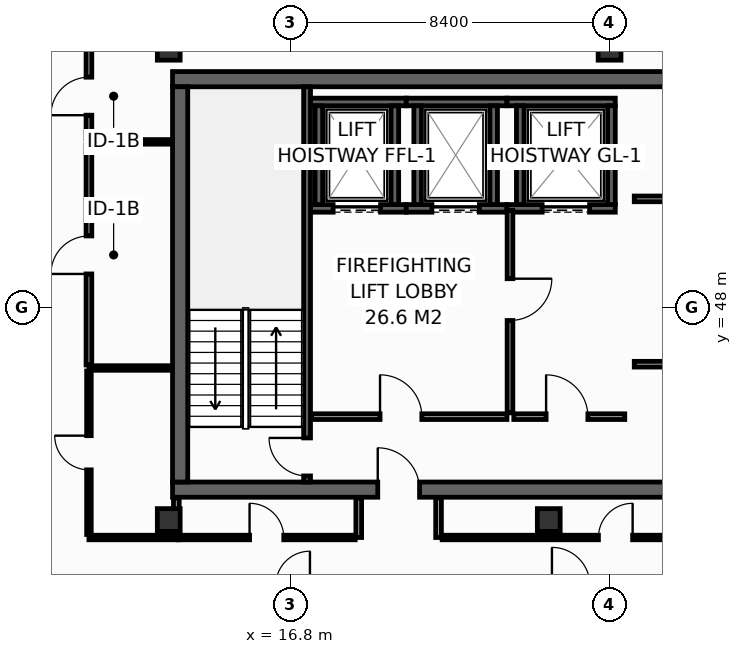
"""IFC4 building model, lengths in metres.
Left out: names, types, materials, properties, quantities, classifications, styles, units other than length and angle.
Written with IfcOpenShell. Run it as: python <this file> out.ifc"""

import sys

from ifc_helpers import new_model, si_unit, direction, frame, frame_2d, origin, origin_2d, place, context, subcontext, project, spatial, rectangle, hollow_rectangle, extrude, element, fill, save


model = new_model("IFC4")
c1 = context("Model", 3, precision=1e-05, world=origin(), true_north=direction((0.0, 1.0)))
c2 = subcontext(c1, "Body", "Model", "MODEL_VIEW")
j1 = project(units=[si_unit("LENGTHUNIT", "METRE"), si_unit("PLANEANGLEUNIT", "RADIAN")], contexts=[c1])
p1 = place(None, origin())
s1 = spatial("IfcSite", under=j1, at=p1, CompositionType="ELEMENT")
p2 = place(p1, origin())
s2 = spatial("IfcBuilding", under=s1, at=p2, CompositionType="ELEMENT")
p3 = place(p2, frame((0.0, 0.0, 319.2)))
s3 = spatial("IfcBuildingStorey", under=s2, at=p3, CompositionType="ELEMENT", Elevation=319.2)
p4 = place(p3, frame((13.7, 43.2, 0.0), z_axis=(0.0, 0.0, 1.0), x_axis=(1.0, 0.0, 0.0)))
e1 = element("IfcWall", 1, at=p4, inside=s3, PredefinedType="SHEAR", context=c2, shape_type="SweptSolid", body=[
    extrude(rectangle(XDim=32.5, YDim=0.4, at=frame_2d((16.25, 0.0))), origin(), (0.0, 0.0, 1.0), 3.95),
])
p5 = place(p4, frame((5.4, 0.0, 0.0)))
e2 = element("IfcOpeningElement", 2, at=p5, cuts=e1, PredefinedType="OPENING", context=c2, shape_type="SweptSolid", body=[
    extrude(rectangle(XDim=1.1, YDim=2.15, at=frame_2d((0.55, 1.075))), frame((0.0, 0.21, 0.0), z_axis=(0.0, -1.0, 0.0), x_axis=(1.0, 0.0, 0.0)), (0.0, 0.0, 1.0), 0.42),
])
p6 = place(p4, frame((25.6, 0.0, 0.0)))
e3 = element("IfcOpeningElement", 3, at=p6, cuts=e1, PredefinedType="OPENING", context=c2, shape_type="SweptSolid", body=[
    extrude(rectangle(XDim=1.1, YDim=2.15, at=frame_2d((0.55, 1.075))), frame((0.0, 0.21, 0.0), z_axis=(0.0, -1.0, 0.0), x_axis=(1.0, 0.0, 0.0)), (0.0, 0.0, 1.0), 0.42),
])
p7 = place(p3, frame((13.7, 54.0, 0.0), z_axis=(0.0, 0.0, 1.0), x_axis=(1.0, 0.0, 0.0)))
e4 = element("IfcWall", 4, at=p7, inside=s3, PredefinedType="SHEAR", context=c2, shape_type="SweptSolid", body=[
    extrude(rectangle(XDim=32.5, YDim=0.4, at=frame_2d((16.25, 0.0))), origin(), (0.0, 0.0, 1.0), 3.95),
])
p8 = place(p3, frame((13.9, 43.4, 0.0), z_axis=(0.0, 0.0, 1.0), x_axis=(0.0, 1.0, 0.0)))
e5 = element("IfcWall", 5, at=p8, inside=s3, PredefinedType="SHEAR", context=c2, shape_type="SweptSolid", body=[
    extrude(rectangle(XDim=10.4, YDim=0.4, at=frame_2d((5.2, 0.0))), origin(), (0.0, 0.0, 1.0), 3.95),
])
for number, where, z_axis, x_axis in (
    (6, (13.6, 54.8, 0.0), (0.0, 0.0, 1.0), (1.0, 0.0, 0.0)),
    (7, (25.2, 54.8, 0.0), (0.0, 0.0, 1.0), (1.0, 0.0, 0.0)),
    (8, (13.6, 42.4, 0.0), (0.0, 0.0, 1.0), (1.0, 0.0, 0.0)),
    (9, (23.6, 42.4, 0.0), (0.0, 0.0, 1.0), (1.0, 0.0, 0.0)),
):
    element("IfcColumn", number, at=place(p3, frame(where, z_axis=z_axis, x_axis=x_axis)), inside=s3, PredefinedType="COLUMN", context=c2, shape_type="SweptSolid", body=[
        extrude(hollow_rectangle(XDim=0.6, YDim=0.6, WallThickness=0.028, at=origin_2d()), origin(), (0.0, 0.0, 1.0), 4.2),
    ])
p9 = place(p3, frame((17.33, 50.6, 0.0), z_axis=(0.0, 0.0, 1.0), x_axis=(1.0, 0.0, 0.0)))
e10 = element("IfcWall", 10, at=p9, inside=s3, PredefinedType="SHEAR", context=c2, shape_type="SweptSolid", body=[
    extrude(rectangle(XDim=2.52, YDim=0.2, at=frame_2d((1.26, 0.0))), origin(), (0.0, 0.0, 1.0), 3.95),
])
p10 = place(p9, frame((0.595, 0.0, 0.0)))
e11 = element("IfcOpeningElement", 11, at=p10, cuts=e10, PredefinedType="OPENING", context=c2, shape_type="SweptSolid", body=[
    extrude(rectangle(XDim=1.25, YDim=2.3, at=frame_2d((0.625, 1.15))), frame((0.0, 0.11, 0.0), z_axis=(0.0, -1.0, 0.0), x_axis=(1.0, 0.0, 0.0)), (0.0, 0.0, 1.0), 0.22),
])
p11 = place(p3, frame((17.33, 53.4, 0.0), z_axis=(0.0, 0.0, 1.0), x_axis=(1.0, 0.0, 0.0)))
e12 = element("IfcWall", 12, at=p11, inside=s3, PredefinedType="SHEAR", context=c2, shape_type="SweptSolid", body=[
    extrude(rectangle(XDim=2.52, YDim=0.2, at=frame_2d((1.26, 0.0))), origin(), (0.0, 0.0, 1.0), 3.95),
])
for number, where, z_axis, x_axis in (
    (13, (17.55, 50.7, 0.0), (0.0, 0.0, 1.0), (0.0, 1.0, 0.0)),
    (14, (19.55, 50.7, 0.0), (0.0, 0.0, 1.0), (0.0, 1.0, 0.0)),
):
    element("IfcWall", number, at=place(p3, frame(where, z_axis=z_axis, x_axis=x_axis)), inside=s3, PredefinedType="SHEAR", context=c2, shape_type="SweptSolid", body=[
        extrude(rectangle(XDim=2.6, YDim=0.2, at=frame_2d((1.3, 0.0))), origin(), (0.0, 0.0, 1.0), 3.95),
    ])
p12 = place(p3, frame((19.85, 50.6, 0.0), z_axis=(0.0, 0.0, 1.0), x_axis=(1.0, 0.0, 0.0)))
e15 = element("IfcWall", 15, at=p12, inside=s3, PredefinedType="SHEAR", context=c2, shape_type="SweptSolid", body=[
    extrude(rectangle(XDim=2.65, YDim=0.2, at=frame_2d((1.325, 0.0))), origin(), (0.0, 0.0, 1.0), 3.95),
])
p13 = place(p12, frame((0.675, 0.0, 0.0)))
e16 = element("IfcOpeningElement", 16, at=p13, cuts=e15, PredefinedType="OPENING", context=c2, shape_type="SweptSolid", body=[
    extrude(rectangle(XDim=1.25, YDim=2.3, at=frame_2d((0.625, 1.15))), frame((0.0, 0.11, 0.0), z_axis=(0.0, -1.0, 0.0), x_axis=(1.0, 0.0, 0.0)), (0.0, 0.0, 1.0), 0.22),
])
p14 = place(p3, frame((19.85, 53.4, 0.0), z_axis=(0.0, 0.0, 1.0), x_axis=(1.0, 0.0, 0.0)))
e17 = element("IfcWall", 17, at=p14, inside=s3, PredefinedType="SHEAR", context=c2, shape_type="SweptSolid", body=[
    extrude(rectangle(XDim=2.65, YDim=0.2, at=frame_2d((1.325, 0.0))), origin(), (0.0, 0.0, 1.0), 3.95),
])
for number, where, z_axis, x_axis in (
    (18, (20.15, 50.7, 0.0), (0.0, 0.0, 1.0), (0.0, 1.0, 0.0)),
    (19, (22.15, 50.7, 0.0), (0.0, 0.0, 1.0), (0.0, 1.0, 0.0)),
):
    element("IfcWall", number, at=place(p3, frame(where, z_axis=z_axis, x_axis=x_axis)), inside=s3, PredefinedType="SHEAR", context=c2, shape_type="SweptSolid", body=[
        extrude(rectangle(XDim=2.6, YDim=0.2, at=frame_2d((1.3, 0.0))), origin(), (0.0, 0.0, 1.0), 3.95),
    ])
p15 = place(p3, frame((22.5, 50.6, 0.0), z_axis=(0.0, 0.0, 1.0), x_axis=(1.0, 0.0, 0.0)))
e20 = element("IfcWall", 20, at=p15, inside=s3, PredefinedType="SHEAR", context=c2, shape_type="SweptSolid", body=[
    extrude(rectangle(XDim=2.85, YDim=0.2, at=frame_2d((1.425, 0.0))), origin(), (0.0, 0.0, 1.0), 3.95),
])
p16 = place(p15, frame((0.925, 0.0, 0.0)))
e21 = element("IfcOpeningElement", 21, at=p16, cuts=e20, PredefinedType="OPENING", context=c2, shape_type="SweptSolid", body=[
    extrude(rectangle(XDim=1.25, YDim=2.3, at=frame_2d((0.625, 1.15))), frame((0.0, 0.11, 0.0), z_axis=(0.0, -1.0, 0.0), x_axis=(1.0, 0.0, 0.0)), (0.0, 0.0, 1.0), 0.22),
])
p17 = place(p3, frame((22.5, 53.4, 0.0), z_axis=(0.0, 0.0, 1.0), x_axis=(1.0, 0.0, 0.0)))
e22 = element("IfcWall", 22, at=p17, inside=s3, PredefinedType="SHEAR", context=c2, shape_type="SweptSolid", body=[
    extrude(rectangle(XDim=2.85, YDim=0.2, at=frame_2d((1.425, 0.0))), origin(), (0.0, 0.0, 1.0), 3.95),
])
for number, where, z_axis, x_axis in (
    (23, (22.85, 50.7, 0.0), (0.0, 0.0, 1.0), (0.0, 1.0, 0.0)),
    (24, (25.25, 50.7, 0.0), (0.0, 0.0, 1.0), (0.0, 1.0, 0.0)),
):
    element("IfcWall", number, at=place(p3, frame(where, z_axis=z_axis, x_axis=x_axis)), inside=s3, PredefinedType="SHEAR", context=c2, shape_type="SweptSolid", body=[
        extrude(rectangle(XDim=2.6, YDim=0.2, at=frame_2d((1.3, 0.0))), origin(), (0.0, 0.0, 1.0), 3.95),
    ])
p18 = place(p3, frame((17.24, 43.4, 0.0), z_axis=(0.0, 0.0, 1.0), x_axis=(0.0, 1.0, 0.0)))
e25 = element("IfcWall", 25, at=p18, inside=s3, PredefinedType="SHEAR", context=c2, shape_type="SweptSolid", body=[
    extrude(rectangle(XDim=10.4, YDim=0.18, at=frame_2d((5.2, 0.0))), origin(), (0.0, 0.0, 1.0), 3.95),
])
p19 = place(p18, frame((0.16, 0.0, 0.0)))
e26 = element("IfcOpeningElement", 26, at=p19, cuts=e25, PredefinedType="OPENING", context=c2, shape_type="SweptSolid", body=[
    extrude(rectangle(XDim=1.0, YDim=2.15, at=frame_2d((0.5, 1.075))), frame((0.0, 0.1, 0.0), z_axis=(0.0, -1.0, 0.0), x_axis=(1.0, 0.0, 0.0)), (0.0, 0.0, 1.0), 0.2),
])
p20 = place(p3, frame((17.36, 45.12, 0.0), z_axis=(0.0, 0.0, 1.0), x_axis=(1.0, 0.0, 0.0)))
e27 = element("IfcWall", 27, at=p20, inside=s3, PredefinedType="PARTITIONING", context=c2, shape_type="SweptSolid", body=[
    extrude(rectangle(XDim=5.14, YDim=0.15, at=frame_2d((2.57, 0.0))), origin(), (0.0, 0.0, 1.0), 3.95),
])
p21 = place(p20, frame((1.8, 0.0, 0.0)))
e28 = element("IfcOpeningElement", 28, at=p21, cuts=e27, PredefinedType="OPENING", context=c2, shape_type="SweptSolid", body=[
    extrude(rectangle(XDim=1.1, YDim=2.15, at=frame_2d((0.55, 1.075))), frame((0.0, 0.085, 0.0), z_axis=(0.0, -1.0, 0.0), x_axis=(1.0, 0.0, 0.0)), (0.0, 0.0, 1.0), 0.17),
])
p22 = place(p3, frame((22.58, 50.55, 0.0), z_axis=(0.0, 0.0, 1.0), x_axis=(0.0, -1.0, 0.0)))
e29 = element("IfcWall", 29, at=p22, inside=s3, PredefinedType="PARTITIONING", context=c2, shape_type="SweptSolid", body=[
    extrude(rectangle(XDim=5.33, YDim=0.15, at=frame_2d((2.665, 0.0))), origin(), (0.0, 0.0, 1.0), 3.95),
])
p23 = place(p22, frame((1.8, 0.0, 0.0)))
e30 = element("IfcOpeningElement", 30, at=p23, cuts=e29, PredefinedType="OPENING", context=c2, shape_type="SweptSolid", body=[
    extrude(rectangle(XDim=1.1, YDim=2.15, at=frame_2d((0.55, 1.075))), frame((0.0, 0.085, 0.0), z_axis=(0.0, -1.0, 0.0), x_axis=(1.0, 0.0, 0.0)), (0.0, 0.0, 1.0), 0.17),
])
p24 = place(p3, frame((22.68, 45.12, 0.0), z_axis=(0.0, 0.0, 1.0), x_axis=(1.0, 0.0, 0.0)))
e31 = element("IfcWall", 31, at=p24, inside=s3, PredefinedType="PARTITIONING", context=c2, shape_type="SweptSolid", body=[
    extrude(rectangle(XDim=2.92, YDim=0.15, at=frame_2d((1.46, 0.0))), origin(), (0.0, 0.0, 1.0), 3.95),
])
p25 = place(p24, frame((0.85, 0.0, 0.0)))
e32 = element("IfcOpeningElement", 32, at=p25, cuts=e31, PredefinedType="OPENING", context=c2, shape_type="SweptSolid", body=[
    extrude(rectangle(XDim=1.1, YDim=2.15, at=frame_2d((0.55, 1.075))), frame((0.0, 0.085, 0.0), z_axis=(0.0, -1.0, 0.0), x_axis=(1.0, 0.0, 0.0)), (0.0, 0.0, 1.0), 0.17),
])
p26 = place(p3, frame((25.85, 50.85, 0.0), z_axis=(0.0, 0.0, 1.0), x_axis=(1.0, 0.0, 0.0)))
e33 = element("IfcWall", 33, at=p26, inside=s3, PredefinedType="PARTITIONING", context=c2, shape_type="SweptSolid", body=[
    extrude(rectangle(XDim=7.65, YDim=0.15, at=frame_2d((3.825, 0.0))), origin(), (0.0, 0.0, 1.0), 3.95),
])
p27 = place(p26, frame((1.25, 0.0, 0.0)))
e34 = element("IfcOpeningElement", 34, at=p27, cuts=e33, PredefinedType="OPENING", context=c2, shape_type="SweptSolid", body=[
    extrude(rectangle(XDim=0.95, YDim=2.15, at=frame_2d((0.475, 1.075))), frame((0.0, 0.085, 0.0), z_axis=(0.0, -1.0, 0.0), x_axis=(1.0, 0.0, 0.0)), (0.0, 0.0, 1.0), 0.17),
])
p28 = place(p26, frame((5.05, 0.0, 0.0)))
e35 = element("IfcOpeningElement", 35, at=p28, cuts=e33, PredefinedType="OPENING", context=c2, shape_type="SweptSolid", body=[
    extrude(rectangle(XDim=0.95, YDim=2.15, at=frame_2d((0.475, 1.075))), frame((0.0, 0.085, 0.0), z_axis=(0.0, -1.0, 0.0), x_axis=(1.0, 0.0, 0.0)), (0.0, 0.0, 1.0), 0.17),
])
p29 = place(p3, frame((25.85, 46.5, 0.0), z_axis=(0.0, 0.0, 1.0), x_axis=(1.0, 0.0, 0.0)))
e36 = element("IfcWall", 36, at=p29, inside=s3, PredefinedType="PARTITIONING", context=c2, shape_type="SweptSolid", body=[
    extrude(rectangle(XDim=7.65, YDim=0.15, at=frame_2d((3.825, 0.0))), origin(), (0.0, 0.0, 1.0), 3.95),
])
p30 = place(p29, frame((2.8, 0.0, 0.0)))
e37 = element("IfcOpeningElement", 37, at=p30, cuts=e36, PredefinedType="OPENING", context=c2, shape_type="SweptSolid", body=[
    extrude(rectangle(XDim=0.95, YDim=2.15, at=frame_2d((0.475, 1.075))), frame((0.0, 0.085, 0.0), z_axis=(0.0, -1.0, 0.0), x_axis=(1.0, 0.0, 0.0)), (0.0, 0.0, 1.0), 0.17),
])
p31 = place(p3, frame((11.5, 41.94, 0.0), z_axis=(0.0, 0.0, 1.0), x_axis=(1.0, 0.0, 0.0)))
e38 = element("IfcWall", 38, at=p31, inside=s3, PredefinedType="PARTITIONING", context=c2, shape_type="SweptSolid", body=[
    extrude(rectangle(XDim=2.35, YDim=0.12, at=frame_2d((1.175, 0.0))), origin(), (0.0, 0.0, 1.0), 3.95),
])
p32 = place(p3, frame((11.5, 52.35, 0.0), z_axis=(0.0, 0.0, 1.0), x_axis=(1.0, 0.0, 0.0)))
e39 = element("IfcWall", 39, at=p32, inside=s3, PredefinedType="PARTITIONING", context=c2, shape_type="SweptSolid", body=[
    extrude(rectangle(XDim=2.18, YDim=0.12, at=frame_2d((1.09, 0.0))), origin(), (0.0, 0.0, 1.0), 3.95),
])
p33 = place(p3, frame((11.5, 52.43, 0.0), z_axis=(0.0, 0.0, 1.0), x_axis=(0.0, 1.0, 0.0)))
e40 = element("IfcWall", 40, at=p33, inside=s3, PredefinedType="PARTITIONING", context=c2, shape_type="SweptSolid", body=[
    extrude(rectangle(XDim=3.565, YDim=0.15, at=frame_2d((1.783, 0.0))), origin(), (0.0, 0.0, 1.0), 3.335),
])
p34 = place(p33, frame((0.622, 0.0, 0.0)))
e41 = element("IfcOpeningElement", 41, at=p34, cuts=e40, PredefinedType="OPENING", context=c2, shape_type="SweptSolid", body=[
    extrude(rectangle(XDim=1.0, YDim=2.15, at=frame_2d((0.5, 1.075))), frame((0.0, 0.085, 0.0), z_axis=(0.0, -1.0, 0.0), x_axis=(1.0, 0.0, 0.0)), (0.0, 0.0, 1.0), 0.17),
])
p35 = place(p3, frame((11.5, 46.4, 0.0), z_axis=(0.0, 0.0, 1.0), x_axis=(1.0, 0.0, 0.0)))
e42 = element("IfcWall", 42, at=p35, inside=s3, PredefinedType="PARTITIONING", context=c2, shape_type="SweptSolid", body=[
    extrude(rectangle(XDim=2.18, YDim=0.12, at=frame_2d((1.09, 0.0))), origin(), (0.0, 0.0, 1.0), 3.95),
])
p36 = place(p3, frame((11.5, 42.02, 0.0), z_axis=(0.0, 0.0, 1.0), x_axis=(0.0, 1.0, 0.0)))
e43 = element("IfcWall", 43, at=p36, inside=s3, PredefinedType="PARTITIONING", context=c2, shape_type="SweptSolid", body=[
    extrude(rectangle(XDim=4.3, YDim=0.12, at=frame_2d((2.15, 0.0))), origin(), (0.0, 0.0, 1.0), 3.347),
])
p37 = place(p36, frame((1.7, 0.0, 0.0)))
e44 = element("IfcOpeningElement", 44, at=p37, cuts=e43, PredefinedType="OPENING", context=c2, shape_type="SweptSolid", body=[
    extrude(rectangle(XDim=0.9, YDim=2.1, at=frame_2d((0.45, 1.05))), frame((0.0, 0.07, 0.0), z_axis=(0.0, -1.0, 0.0), x_axis=(1.0, 0.0, 0.0)), (0.0, 0.0, 1.0), 0.14),
])
p38 = place(p3, frame((11.5, 46.48, 0.0), z_axis=(0.0, 0.0, 1.0), x_axis=(0.0, 1.0, 0.0)))
e45 = element("IfcWall", 45, at=p38, inside=s3, PredefinedType="PARTITIONING", context=c2, shape_type="SweptSolid", body=[
    extrude(rectangle(XDim=5.79, YDim=0.15, at=frame_2d((2.895, 0.0))), origin(), (0.0, 0.0, 1.0), 3.95),
])
p39 = place(p38, frame((2.395, 0.0, 0.0)))
e46 = element("IfcOpeningElement", 46, at=p39, cuts=e45, PredefinedType="OPENING", context=c2, shape_type="SweptSolid", body=[
    extrude(rectangle(XDim=1.0, YDim=2.15, at=frame_2d((0.5, 1.075))), frame((0.0, 0.085, 0.0), z_axis=(0.0, -1.0, 0.0), x_axis=(1.0, 0.0, 0.0)), (0.0, 0.0, 1.0), 0.17),
])
p40 = place(p3, frame((13.8, 42.02, 0.0), z_axis=(0.0, 0.0, 1.0), x_axis=(0.0, 1.0, 0.0)))
e47 = element("IfcWall", 47, at=p40, inside=s3, PredefinedType="PARTITIONING", context=c2, shape_type="SweptSolid", body=[
    extrude(rectangle(XDim=0.96, YDim=0.15, at=frame_2d((0.48, 0.0))), origin(), (0.0, 0.0, 1.0), 3.95),
])
for number, where, z_axis, x_axis in (
    (48, (18.6, 41.94, 0.0), (0.0, 0.0, 1.0), (0.0, 1.0, 0.0)),
    (49, (20.7, 41.94, 0.0), (0.0, 0.0, 1.0), (0.0, 1.0, 0.0)),
):
    element("IfcWall", number, at=place(p3, frame(where, z_axis=z_axis, x_axis=x_axis)), inside=s3, PredefinedType="PARTITIONING", context=c2, shape_type="SweptSolid", body=[
        extrude(rectangle(XDim=1.04, YDim=0.15, at=frame_2d((0.52, 0.0))), origin(), (0.0, 0.0, 1.0), 3.95),
    ])
p41 = place(p3, frame((13.85, 41.94, 0.0), z_axis=(0.0, 0.0, 1.0), x_axis=(1.0, 0.0, 0.0)))
e50 = element("IfcWall", 50, at=p41, inside=s3, PredefinedType="PARTITIONING", context=c2, shape_type="SweptSolid", body=[
    extrude(rectangle(XDim=4.655, YDim=0.12, at=frame_2d((2.327, 0.0))), origin(), (0.0, 0.0, 1.0), 3.95),
])
p42 = place(p41, frame((1.877, 0.0, 0.0)))
e51 = element("IfcOpeningElement", 51, at=p42, cuts=e50, PredefinedType="OPENING", context=c2, shape_type="SweptSolid", body=[
    extrude(rectangle(XDim=0.9, YDim=2.1, at=frame_2d((0.45, 1.05))), frame((0.0, 0.07, 0.0), z_axis=(0.0, -1.0, 0.0), x_axis=(1.0, 0.0, 0.0)), (0.0, 0.0, 1.0), 0.14),
])
p43 = place(p3, frame((20.795, 41.94, 0.0), z_axis=(0.0, 0.0, 1.0), x_axis=(1.0, 0.0, 0.0)))
e52 = element("IfcWall", 52, at=p43, inside=s3, PredefinedType="PARTITIONING", context=c2, shape_type="SweptSolid", body=[
    extrude(rectangle(XDim=9.125, YDim=0.12, at=frame_2d((4.562, 0.0))), origin(), (0.0, 0.0, 1.0), 3.95),
])
p44 = place(p43, frame((4.112, 0.0, 0.0)))
e53 = element("IfcOpeningElement", 53, at=p44, cuts=e52, PredefinedType="OPENING", context=c2, shape_type="SweptSolid", body=[
    extrude(rectangle(XDim=0.9, YDim=2.1, at=frame_2d((0.45, 1.05))), frame((0.0, 0.07, 0.0), z_axis=(0.0, -1.0, 0.0), x_axis=(1.0, 0.0, 0.0)), (0.0, 0.0, 1.0), 0.14),
])
p45 = place(p10, origin())
e54 = element("IfcDoor", 54, at=p45, inside=s3, OperationType="SLIDING_TO_LEFT", PredefinedType="DOOR", context=c2, shape_type="SweptSolid", body=[
    extrude(rectangle(XDim=1.25, YDim=2.3, at=frame_2d((0.625, 1.15))), frame((0.0, 0.025, 0.0), z_axis=(0.0, -1.0, 0.0), x_axis=(1.0, 0.0, 0.0)), (0.0, 0.0, 1.0), 0.05),
])
fill(e11, e54)
p46 = place(p13, origin())
e55 = element("IfcDoor", 55, at=p46, inside=s3, OperationType="SLIDING_TO_LEFT", PredefinedType="DOOR", context=c2, shape_type="SweptSolid", body=[
    extrude(rectangle(XDim=1.25, YDim=2.3, at=frame_2d((0.625, 1.15))), frame((0.0, 0.025, 0.0), z_axis=(0.0, -1.0, 0.0), x_axis=(1.0, 0.0, 0.0)), (0.0, 0.0, 1.0), 0.05),
])
fill(e16, e55)
p47 = place(p16, origin())
e56 = element("IfcDoor", 56, at=p47, inside=s3, OperationType="SLIDING_TO_LEFT", PredefinedType="DOOR", context=c2, shape_type="SweptSolid", body=[
    extrude(rectangle(XDim=1.25, YDim=2.3, at=frame_2d((0.625, 1.15))), frame((0.0, 0.025, 0.0), z_axis=(0.0, -1.0, 0.0), x_axis=(1.0, 0.0, 0.0)), (0.0, 0.0, 1.0), 0.05),
])
fill(e21, e56)
p48 = place(p19, origin())
e57 = element("IfcDoor", 57, at=p48, inside=s3, OperationType="SINGLE_SWING_RIGHT", PredefinedType="DOOR", context=c2, shape_type="SweptSolid", body=[
    extrude(rectangle(XDim=1.0, YDim=2.15, at=frame_2d((0.5, 1.075))), frame((0.0, 0.025, 0.0), z_axis=(0.0, -1.0, 0.0), x_axis=(1.0, 0.0, 0.0)), (0.0, 0.0, 1.0), 0.05),
])
fill(e26, e57)
p49 = place(p21, origin())
e58 = element("IfcDoor", 58, at=p49, inside=s3, OperationType="SINGLE_SWING_LEFT", PredefinedType="DOOR", context=c2, shape_type="SweptSolid", body=[
    extrude(rectangle(XDim=1.1, YDim=2.15, at=frame_2d((0.55, 1.075))), frame((0.0, 0.025, 0.0), z_axis=(0.0, -1.0, 0.0), x_axis=(1.0, 0.0, 0.0)), (0.0, 0.0, 1.0), 0.05),
])
fill(e28, e58)
p50 = place(p23, origin())
e59 = element("IfcDoor", 59, at=p50, inside=s3, OperationType="SINGLE_SWING_LEFT", PredefinedType="DOOR", context=c2, shape_type="SweptSolid", body=[
    extrude(rectangle(XDim=1.1, YDim=2.15, at=frame_2d((0.55, 1.075))), frame((0.0, 0.025, 0.0), z_axis=(0.0, -1.0, 0.0), x_axis=(1.0, 0.0, 0.0)), (0.0, 0.0, 1.0), 0.05),
])
fill(e30, e59)
p51 = place(p25, origin())
e60 = element("IfcDoor", 60, at=p51, inside=s3, OperationType="SINGLE_SWING_LEFT", PredefinedType="DOOR", context=c2, shape_type="SweptSolid", body=[
    extrude(rectangle(XDim=1.1, YDim=2.15, at=frame_2d((0.55, 1.075))), frame((0.0, 0.025, 0.0), z_axis=(0.0, -1.0, 0.0), x_axis=(1.0, 0.0, 0.0)), (0.0, 0.0, 1.0), 0.05),
])
fill(e32, e60)
p52 = place(p5, origin())
e61 = element("IfcDoor", 61, at=p52, inside=s3, OperationType="SINGLE_SWING_LEFT", PredefinedType="DOOR", context=c2, shape_type="SweptSolid", body=[
    extrude(rectangle(XDim=1.1, YDim=2.15, at=frame_2d((0.55, 1.075))), frame((0.0, 0.025, 0.0), z_axis=(0.0, -1.0, 0.0), x_axis=(1.0, 0.0, 0.0)), (0.0, 0.0, 1.0), 0.05),
])
fill(e2, e61)
p53 = place(p34, origin())
e62 = element("IfcDoor", 62, at=p53, inside=s3, OperationType="SINGLE_SWING_LEFT", PredefinedType="DOOR", context=c2, shape_type="SweptSolid", body=[
    extrude(rectangle(XDim=1.0, YDim=2.15, at=frame_2d((0.5, 1.075))), frame((0.0, 0.025, 0.0), z_axis=(0.0, -1.0, 0.0), x_axis=(1.0, 0.0, 0.0)), (0.0, 0.0, 1.0), 0.05),
])
fill(e41, e62)
p54 = place(p37, origin())
e63 = element("IfcDoor", 63, at=p54, inside=s3, OperationType="SINGLE_SWING_RIGHT", PredefinedType="DOOR", context=c2, shape_type="SweptSolid", body=[
    extrude(rectangle(XDim=0.9, YDim=2.1, at=frame_2d((0.45, 1.05))), frame((0.0, 0.025, 0.0), z_axis=(0.0, -1.0, 0.0), x_axis=(1.0, 0.0, 0.0)), (0.0, 0.0, 1.0), 0.05),
])
fill(e44, e63)
p55 = place(p39, origin())
e64 = element("IfcDoor", 64, at=p55, inside=s3, OperationType="SINGLE_SWING_LEFT", PredefinedType="DOOR", context=c2, shape_type="SweptSolid", body=[
    extrude(rectangle(XDim=1.0, YDim=2.15, at=frame_2d((0.5, 1.075))), frame((0.0, 0.025, 0.0), z_axis=(0.0, -1.0, 0.0), x_axis=(1.0, 0.0, 0.0)), (0.0, 0.0, 1.0), 0.05),
])
fill(e46, e64)
p56 = place(p42, origin())
e65 = element("IfcDoor", 65, at=p56, inside=s3, OperationType="SINGLE_SWING_LEFT", PredefinedType="DOOR", context=c2, shape_type="SweptSolid", body=[
    extrude(rectangle(XDim=0.9, YDim=2.1, at=frame_2d((0.45, 1.05))), frame((0.0, 0.025, 0.0), z_axis=(0.0, -1.0, 0.0), x_axis=(1.0, 0.0, 0.0)), (0.0, 0.0, 1.0), 0.05),
])
fill(e51, e65)
p57 = place(p44, origin())
e66 = element("IfcDoor", 66, at=p57, inside=s3, OperationType="SINGLE_SWING_RIGHT", PredefinedType="DOOR", context=c2, shape_type="SweptSolid", body=[
    extrude(rectangle(XDim=0.9, YDim=2.1, at=frame_2d((0.45, 1.05))), frame((0.0, 0.025, 0.0), z_axis=(0.0, -1.0, 0.0), x_axis=(1.0, 0.0, 0.0)), (0.0, 0.0, 1.0), 0.05),
])
fill(e53, e66)
save(model, sys.argv[1])
